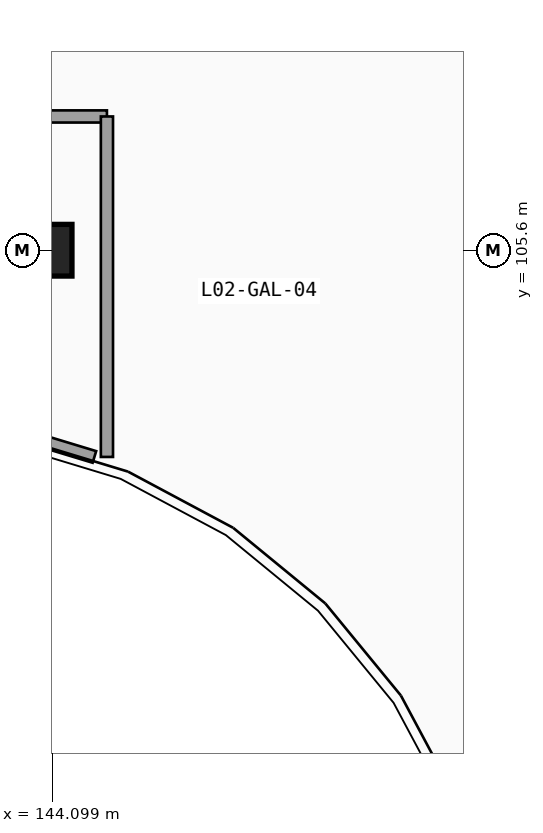
"""IFC4 building model, lengths in metres.
Left out: names, types, materials, properties, quantities, classifications, styles, units other than length and angle.
Written with IfcOpenShell. Run it as: python <this file> out.ifc"""

import sys

from ifc_helpers import new_model, si_unit, direction, frame, frame_2d, origin, origin_2d, place, context, subcontext, project, spatial, rectangle, extrude, element, save


model = new_model("IFC4")
c1 = context("Model", 3, precision=1e-05, world=origin(), true_north=direction((0.0, 1.0)))
c2 = subcontext(c1, "Body", "Model", "MODEL_VIEW")
j1 = project(units=[si_unit("LENGTHUNIT", "METRE"), si_unit("PLANEANGLEUNIT", "RADIAN")], contexts=[c1])
p1 = place(None, origin())
s1 = spatial("IfcSite", under=j1, at=p1, CompositionType="ELEMENT")
p2 = place(p1, origin())
s2 = spatial("IfcBuilding", under=s1, at=p2, CompositionType="ELEMENT")
p3 = place(p2, frame((0.0, 0.0, 9.6)))
s3 = spatial("IfcBuildingStorey", under=s2, at=p3, CompositionType="ELEMENT", Elevation=9.6)
p4 = place(p3, frame((144.0, 105.6, 0.0), z_axis=(0.0, 0.0, 1.0), x_axis=(1.0, 0.0, 0.0)))
e1 = element("IfcColumn", 1, at=p4, inside=s3, PredefinedType="COLUMN", context=c2, shape_type="SweptSolid", body=[
    extrude(rectangle(XDim=0.85, YDim=0.85, at=origin_2d()), origin(), (0.0, 0.0, 1.0), 4.5),
])
p5 = place(p3, frame((140.38, 107.8, 0.0), z_axis=(0.0, 0.0, 1.0), x_axis=(1.0, 0.0, 0.0)))
e2 = element("IfcWall", 2, at=p5, inside=s3, PredefinedType="PARTITIONING", context=c2, shape_type="SweptSolid", body=[
    extrude(rectangle(XDim=4.62, YDim=0.2, at=frame_2d((2.31, 0.0))), origin(), (0.0, 0.0, 1.0), 3.613),
])
p6 = place(p3, frame((145.0, 107.8, 0.0), z_axis=(0.0, 0.0, 1.0), x_axis=(0.0, -1.0, 0.0)))
e3 = element("IfcWall", 3, at=p6, inside=s3, PredefinedType="PARTITIONING", context=c2, shape_type="SweptSolid", body=[
    extrude(rectangle(XDim=5.6, YDim=0.2, at=frame_2d((2.8, 0.0))), origin(), (0.0, 0.0, 1.0), 3.466),
])
p7 = place(p3, frame((144.794, 102.2, 0.0), z_axis=(0.0, 0.0, 1.0), x_axis=(-0.956921766266, 0.290345885534, 0.0)))
e4 = element("IfcWall", 4, at=p7, inside=s3, PredefinedType="PARTITIONING", context=c2, shape_type="SweptSolid", body=[
    extrude(rectangle(XDim=1.441, YDim=0.2, at=frame_2d((0.721, 0.0))), origin(), (0.0, 0.0, 1.0), 4.22),
])
save(model, sys.argv[1])
